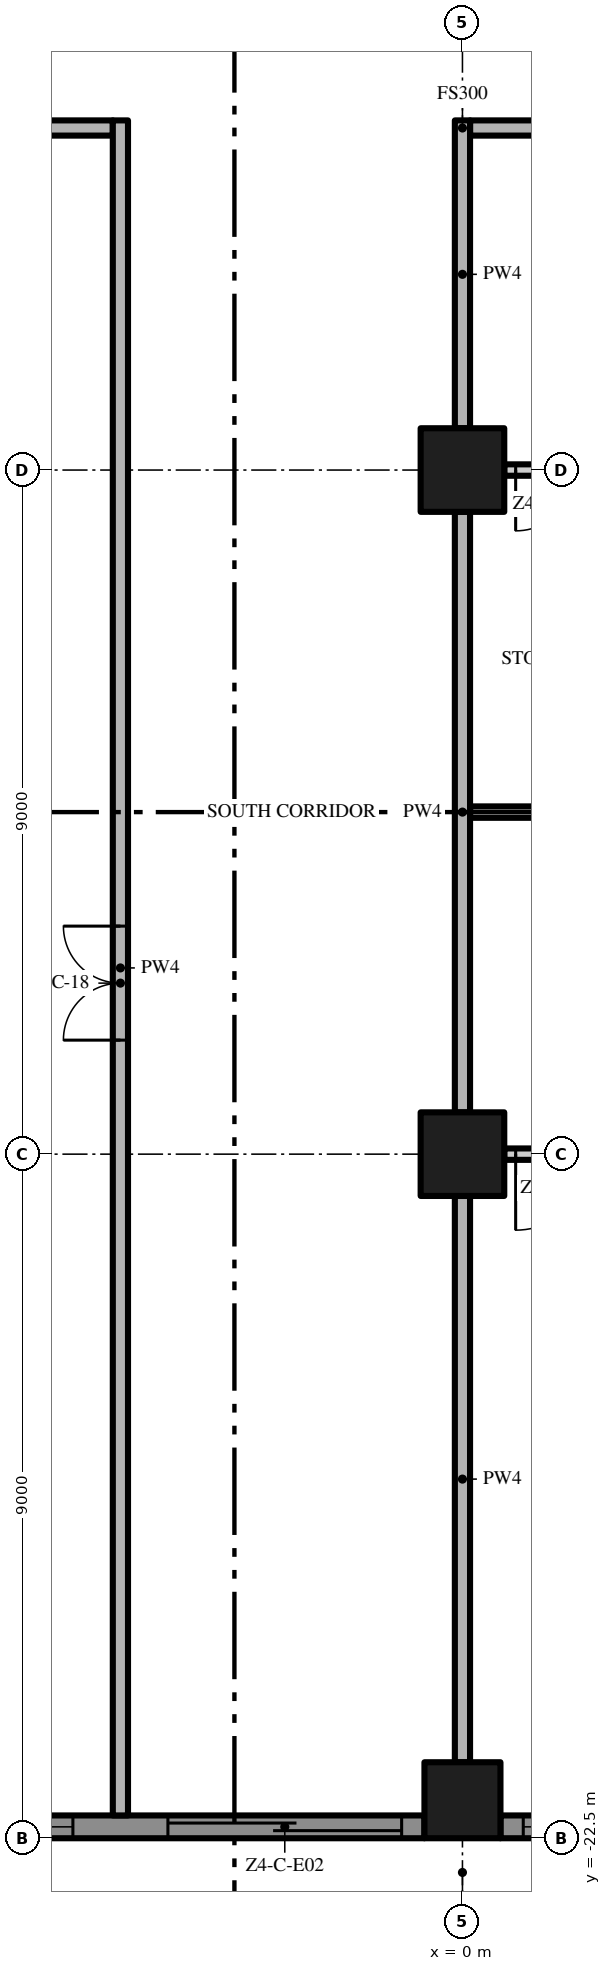
"""IFC4 building model, lengths in metres.
Left out: names, types, materials, properties, quantities, classifications, styles, units other than length and angle.
Written with IfcOpenShell. Run it as: python <this file> out.ifc"""

import sys

from ifc_helpers import new_model, si_unit, direction, frame, frame_2d, origin, origin_2d, place, context, subcontext, project, spatial, polyline, rectangle, outline, extrude, element, fill, save


model = new_model("IFC4")
c1 = context("Model", 3, precision=1e-05, world=origin(), true_north=direction((0.0, 1.0)))
c2 = subcontext(c1, "Body", "Model", "MODEL_VIEW")
j1 = project(units=[si_unit("LENGTHUNIT", "METRE"), si_unit("PLANEANGLEUNIT", "RADIAN")], contexts=[c1])
p1 = place(None, origin())
s1 = spatial("IfcSite", under=j1, at=p1, CompositionType="ELEMENT")
p2 = place(p1, origin())
s2 = spatial("IfcBuilding", under=s1, at=p2, CompositionType="ELEMENT")
p3 = place(p2, frame((0.0, 0.0, 211.0)))
s3 = spatial("IfcBuildingStorey", under=s2, at=p3, CompositionType="ELEMENT", Elevation=211.0)
p4 = place(p3, frame((0.0, -13.5, 0.0), z_axis=(0.0, 0.0, 1.0), x_axis=(1.0, 0.0, 0.0)))
e1 = element("IfcColumn", 1, at=p4, inside=s3, PredefinedType="COLUMN", context=c2, shape_type="SweptSolid", body=[
    extrude(rectangle(XDim=1.1, YDim=1.1, at=origin_2d()), origin(), (0.0, 0.0, 1.0), 3.5),
])
p5 = place(p3, frame((0.0, -22.0, 0.0), z_axis=(0.0, 0.0, 1.0), x_axis=(1.0, 0.0, 0.0)))
e2 = element("IfcColumn", 2, at=p5, inside=s3, PredefinedType="COLUMN", context=c2, shape_type="SweptSolid", body=[
    extrude(rectangle(XDim=1.0, YDim=1.0, at=origin_2d()), origin(), (0.0, 0.0, 1.0), 3.5),
])
p6 = place(p3, frame((0.0, -4.5, 0.0), z_axis=(0.0, 0.0, 1.0), x_axis=(1.0, 0.0, 0.0)))
e3 = element("IfcColumn", 3, at=p6, inside=s3, PredefinedType="COLUMN", context=c2, shape_type="SweptSolid", body=[
    extrude(rectangle(XDim=1.1, YDim=1.1, at=origin_2d()), origin(), (0.0, 0.0, 1.0), 3.5),
])
p7 = place(p3, frame((-0.5, -22.35, 0.0), z_axis=(0.0, 0.0, 1.0), x_axis=(-1.0, 0.0, 0.0)))
e4 = element("IfcWall", 4, at=p7, inside=s3, PredefinedType="SOLIDWALL", context=c2, shape_type="SweptSolid", body=[
    extrude(rectangle(XDim=8.0, YDim=0.3, at=frame_2d((4.0, 0.0))), origin(), (0.0, 0.0, 1.0), 3.5),
])
p8 = place(p7, frame((4.625, 0.0, 0.45)))
e5 = element("IfcOpeningElement", 5, at=p8, cuts=e4, PredefinedType="OPENING", context=c2, shape_type="SweptSolid", body=[
    extrude(rectangle(XDim=3.075, YDim=2.65, at=frame_2d((1.538, 1.325))), frame((0.0, 0.16, 0.0), z_axis=(0.0, -1.0, 0.0), x_axis=(1.0, 0.0, 0.0)), (0.0, 0.0, 1.0), 0.32),
])
p9 = place(p7, frame((0.3, 0.0, 0.0)))
e6 = element("IfcOpeningElement", 6, at=p9, cuts=e4, PredefinedType="OPENING", context=c2, shape_type="SweptSolid", body=[
    extrude(rectangle(XDim=3.075, YDim=2.4, at=frame_2d((1.538, 1.2))), frame((0.0, 0.16, 0.0), z_axis=(0.0, -1.0, 0.0), x_axis=(1.0, 0.0, 0.0)), (0.0, 0.0, 1.0), 0.32),
])
p10 = place(p3, frame((8.5, -22.35, 0.0), z_axis=(0.0, 0.0, 1.0), x_axis=(-1.0, 0.0, 0.0)))
e7 = element("IfcWall", 7, at=p10, inside=s3, PredefinedType="SOLIDWALL", context=c2, shape_type="SweptSolid", body=[
    extrude(rectangle(XDim=8.0, YDim=0.3, at=frame_2d((4.0, 0.0))), origin(), (0.0, 0.0, 1.0), 3.5),
])
p11 = place(p10, frame((4.625, 0.0, 0.45)))
e8 = element("IfcOpeningElement", 8, at=p11, cuts=e7, PredefinedType="OPENING", context=c2, shape_type="SweptSolid", body=[
    extrude(rectangle(XDim=3.075, YDim=2.65, at=frame_2d((1.538, 1.325))), frame((0.0, 0.16, 0.0), z_axis=(0.0, -1.0, 0.0), x_axis=(1.0, 0.0, 0.0)), (0.0, 0.0, 1.0), 0.32),
])
p12 = place(p10, frame((0.3, 0.0, 0.45)))
e9 = element("IfcOpeningElement", 9, at=p12, cuts=e7, PredefinedType="OPENING", context=c2, shape_type="SweptSolid", body=[
    extrude(rectangle(XDim=3.075, YDim=2.65, at=frame_2d((1.538, 1.325))), frame((0.0, 0.16, 0.0), z_axis=(0.0, -1.0, 0.0), x_axis=(1.0, 0.0, 0.0)), (0.0, 0.0, 1.0), 0.32),
])
p13 = place(p3, origin())
e10 = element("IfcWall", 10, at=p13, inside=s3, PredefinedType="USERDEFINED", context=c2, shape_type="SweptSolid", body=[
    extrude(outline(polyline([(-22.5, -24.3), (-21.0, -25.005), (-19.5, -25.441), (-18.75, -25.5), (-18.0, -25.441), (-16.5, -25.005), (-15.0, -24.3), (-13.5, -23.595), (-12.0, -23.159), (-11.25, -23.1), (-10.5, -23.159), (-9.0, -23.595), (-7.5, -24.3), (-6.0, -25.005), (-4.5, -25.441), (-3.75, -25.5), (-3.0, -25.441), (-1.5, -25.005), (0.0, -24.3), (1.5, -23.595), (3.0, -23.159), (3.75, -23.1), (4.5, -23.159), (6.0, -23.595), (7.5, -24.3), (9.0, -25.005), (10.5, -25.441), (11.25, -25.5), (12.0, -25.441), (13.5, -25.005), (15.0, -24.3), (16.5, -23.595), (18.0, -23.159), (18.75, -23.1), (19.5, -23.159), (21.0, -23.595), (22.5, -24.3), (22.606, -24.074), (21.089, -23.36), (19.545, -22.911), (18.75, -22.849), (17.955, -22.911), (16.411, -23.36), (14.894, -24.074), (13.411, -24.771), (11.955, -25.194), (11.25, -25.249), (10.545, -25.194), (9.089, -24.771), (7.606, -24.074), (6.089, -23.36), (4.545, -22.911), (3.75, -22.849), (2.955, -22.911), (1.411, -23.36), (-0.106, -24.074), (-1.589, -24.771), (-3.045, -25.194), (-3.75, -25.249), (-4.455, -25.194), (-5.911, -24.771), (-7.394, -24.074), (-8.911, -23.36), (-10.455, -22.911), (-11.25, -22.849), (-12.045, -22.911), (-13.589, -23.36), (-15.106, -24.074), (-16.589, -24.771), (-18.045, -25.194), (-18.75, -25.249), (-19.455, -25.194), (-20.911, -24.771), (-22.394, -24.074), (-22.5, -24.3)])), origin(), (0.0, 0.0, 1.0), 0.9),
])
p14 = place(p3, frame((8.45, -13.5, 0.0), z_axis=(0.0, 0.0, 1.0), x_axis=(-1.0, 0.0, 0.0)))
e11 = element("IfcWall", 11, at=p14, inside=s3, PredefinedType="PARTITIONING", context=c2, shape_type="SweptSolid", body=[
    extrude(rectangle(XDim=7.9, YDim=0.15, at=frame_2d((3.95, 0.0))), origin(), (0.0, 0.0, 1.0), 3.5),
])
p15 = place(p14, frame((6.75, 0.0, 0.0)))
e12 = element("IfcOpeningElement", 12, at=p15, cuts=e11, PredefinedType="OPENING", context=c2, shape_type="SweptSolid", body=[
    extrude(rectangle(XDim=1.0, YDim=2.4, at=frame_2d((0.5, 1.2))), frame((0.0, 0.085, 0.0), z_axis=(0.0, -1.0, 0.0), x_axis=(1.0, 0.0, 0.0)), (0.0, 0.0, 1.0), 0.17),
])
p16 = place(p14, frame((0.15, 0.0, 0.0)))
e13 = element("IfcOpeningElement", 13, at=p16, cuts=e11, PredefinedType="OPENING", context=c2, shape_type="SweptSolid", body=[
    extrude(rectangle(XDim=1.0, YDim=2.4, at=frame_2d((0.5, 1.2))), frame((0.0, 0.085, 0.0), z_axis=(0.0, -1.0, 0.0), x_axis=(1.0, 0.0, 0.0)), (0.0, 0.0, 1.0), 0.17),
])
p17 = place(p3, frame((0.1, -9.0, 0.0), z_axis=(0.0, 0.0, 1.0), x_axis=(1.0, 0.0, 0.0)))
e14 = element("IfcWall", 14, at=p17, inside=s3, PredefinedType="PARTITIONING", context=c2, shape_type="SweptSolid", body=[
    extrude(rectangle(XDim=11.525, YDim=0.15, at=frame_2d((5.763, 0.0))), origin(), (0.0, 0.0, 1.0), 3.5),
])
p18 = place(p17, frame((5.85, 0.0, 0.0)))
e15 = element("IfcOpeningElement", 15, at=p18, cuts=e14, PredefinedType="OPENING", context=c2, shape_type="SweptSolid", body=[
    extrude(rectangle(XDim=1.0, YDim=2.4, at=frame_2d((0.5, 1.2))), frame((0.0, 0.085, 0.0), z_axis=(0.0, -1.0, 0.0), x_axis=(1.0, 0.0, 0.0)), (0.0, 0.0, 1.0), 0.17),
])
p19 = place(p3, frame((8.45, -4.5, 0.0), z_axis=(0.0, 0.0, 1.0), x_axis=(-1.0, 0.0, 0.0)))
e16 = element("IfcWall", 16, at=p19, inside=s3, PredefinedType="PARTITIONING", context=c2, shape_type="SweptSolid", body=[
    extrude(rectangle(XDim=7.9, YDim=0.15, at=frame_2d((3.95, 0.0))), origin(), (0.0, 0.0, 1.0), 3.5),
])
p20 = place(p19, frame((6.95, 0.0, 0.0)))
e17 = element("IfcOpeningElement", 17, at=p20, cuts=e16, PredefinedType="OPENING", context=c2, shape_type="SweptSolid", body=[
    extrude(rectangle(XDim=0.8, YDim=2.0, at=frame_2d((0.4, 1.0))), frame((0.0, 0.085, 0.0), z_axis=(0.0, -1.0, 0.0), x_axis=(1.0, 0.0, 0.0)), (0.0, 0.0, 1.0), 0.17),
])
p21 = place(p19, frame((5.45, 0.0, 0.0)))
e18 = element("IfcOpeningElement", 18, at=p21, cuts=e16, PredefinedType="OPENING", context=c2, shape_type="SweptSolid", body=[
    extrude(rectangle(XDim=0.8, YDim=2.0, at=frame_2d((0.4, 1.0))), frame((0.0, 0.085, 0.0), z_axis=(0.0, -1.0, 0.0), x_axis=(1.0, 0.0, 0.0)), (0.0, 0.0, 1.0), 0.17),
])
p22 = place(p3, frame((-17.4, 0.0, 0.0), z_axis=(0.0, 0.0, 1.0), x_axis=(1.0, 0.0, 0.0)))
e19 = element("IfcWall", 19, at=p22, inside=s3, PredefinedType="PARTITIONING", context=c2, shape_type="SweptSolid", body=[
    extrude(rectangle(XDim=12.8, YDim=0.2, at=frame_2d((6.4, 0.0))), origin(), (0.0, 0.0, 1.0), 3.5),
])
p23 = place(p3, frame((17.4, 0.0, 0.0), z_axis=(0.0, 0.0, 1.0), x_axis=(-1.0, 0.0, 0.0)))
e20 = element("IfcWall", 20, at=p23, inside=s3, PredefinedType="PARTITIONING", context=c2, shape_type="SweptSolid", body=[
    extrude(rectangle(XDim=17.3, YDim=0.2, at=frame_2d((8.65, 0.0))), origin(), (0.0, 0.0, 1.0), 3.5),
])
p24 = place(p23, frame((7.65, 0.0, 0.0)))
e21 = element("IfcOpeningElement", 21, at=p24, cuts=e20, PredefinedType="OPENING", context=c2, shape_type="SweptSolid", body=[
    extrude(rectangle(XDim=1.5, YDim=2.4, at=frame_2d((0.75, 1.2))), frame((0.0, 0.11, 0.0), z_axis=(0.0, -1.0, 0.0), x_axis=(1.0, 0.0, 0.0)), (0.0, 0.0, 1.0), 0.22),
])
p25 = place(p3, frame((-4.5, -22.2, 0.0), z_axis=(0.0, 0.0, 1.0), x_axis=(0.0, 1.0, 0.0)))
e22 = element("IfcWall", 22, at=p25, inside=s3, PredefinedType="PARTITIONING", context=c2, shape_type="SweptSolid", body=[
    extrude(rectangle(XDim=22.3, YDim=0.2, at=frame_2d((11.15, 0.0))), origin(), (0.0, 0.0, 1.0), 3.5),
])
p26 = place(p25, frame((10.2, 0.0, 0.0)))
e23 = element("IfcOpeningElement", 23, at=p26, cuts=e22, PredefinedType="OPENING", context=c2, shape_type="SweptSolid", body=[
    extrude(rectangle(XDim=1.5, YDim=2.4, at=frame_2d((0.75, 1.2))), frame((0.0, 0.11, 0.0), z_axis=(0.0, -1.0, 0.0), x_axis=(1.0, 0.0, 0.0)), (0.0, 0.0, 1.0), 0.22),
])
p27 = place(p3, frame((0.0, -21.5, 0.0), z_axis=(0.0, 0.0, 1.0), x_axis=(0.0, 1.0, 0.0)))
e24 = element("IfcWall", 24, at=p27, inside=s3, PredefinedType="PARTITIONING", context=c2, shape_type="SweptSolid", body=[
    extrude(rectangle(XDim=7.45, YDim=0.2, at=frame_2d((3.725, 0.0))), origin(), (0.0, 0.0, 1.0), 3.5),
])
p28 = place(p3, frame((0.0, -12.95, 0.0), z_axis=(0.0, 0.0, 1.0), x_axis=(0.0, 1.0, 0.0)))
e25 = element("IfcWall", 25, at=p28, inside=s3, PredefinedType="PARTITIONING", context=c2, shape_type="SweptSolid", body=[
    extrude(rectangle(XDim=7.9, YDim=0.2, at=frame_2d((3.95, 0.0))), origin(), (0.0, 0.0, 1.0), 3.5),
])
p29 = place(p3, frame((0.0, -3.95, 0.0), z_axis=(0.0, 0.0, 1.0), x_axis=(0.0, 1.0, 0.0)))
e26 = element("IfcWall", 26, at=p29, inside=s3, PredefinedType="PARTITIONING", context=c2, shape_type="SweptSolid", body=[
    extrude(rectangle(XDim=4.05, YDim=0.2, at=frame_2d((2.025, 0.0))), origin(), (0.0, 0.0, 1.0), 3.5),
])
p30 = place(p8, origin())
e27 = element("IfcWindow", 27, at=p30, inside=s3, PartitioningType="SINGLE_PANEL", PredefinedType="WINDOW", context=c2, shape_type="SweptSolid", body=[
    extrude(rectangle(XDim=3.075, YDim=2.65, at=frame_2d((1.538, 1.325))), frame((0.0, 0.03, 0.0), z_axis=(0.0, -1.0, 0.0), x_axis=(1.0, 0.0, 0.0)), (0.0, 0.0, 1.0), 0.06),
])
fill(e5, e27)
p31 = place(p9, origin())
e28 = element("IfcDoor", 28, at=p31, inside=s3, OperationType="SINGLE_SWING_LEFT", PredefinedType="DOOR", context=c2, shape_type="SweptSolid", body=[
    extrude(rectangle(XDim=3.075, YDim=2.4, at=frame_2d((1.538, 1.2))), frame((0.0, 0.025, 0.0), z_axis=(0.0, -1.0, 0.0), x_axis=(1.0, 0.0, 0.0)), (0.0, 0.0, 1.0), 0.05),
])
fill(e6, e28)
p32 = place(p11, origin())
e29 = element("IfcWindow", 29, at=p32, inside=s3, PartitioningType="SINGLE_PANEL", PredefinedType="WINDOW", context=c2, shape_type="SweptSolid", body=[
    extrude(rectangle(XDim=3.075, YDim=2.65, at=frame_2d((1.538, 1.325))), frame((0.0, 0.03, 0.0), z_axis=(0.0, -1.0, 0.0), x_axis=(1.0, 0.0, 0.0)), (0.0, 0.0, 1.0), 0.06),
])
fill(e8, e29)
p33 = place(p26, origin())
e30 = element("IfcDoor", 30, at=p33, inside=s3, OperationType="DOUBLE_DOOR_SINGLE_SWING", PredefinedType="DOOR", context=c2, shape_type="SweptSolid", body=[
    extrude(rectangle(XDim=1.5, YDim=2.4, at=frame_2d((0.75, 1.2))), frame((0.0, 0.025, 0.0), z_axis=(0.0, -1.0, 0.0), x_axis=(1.0, 0.0, 0.0)), (0.0, 0.0, 1.0), 0.05),
])
fill(e23, e30)
p34 = place(p20, origin())
e31 = element("IfcDoor", 31, at=p34, inside=s3, OperationType="SINGLE_SWING_RIGHT", PredefinedType="DOOR", context=c2, shape_type="SweptSolid", body=[
    extrude(rectangle(XDim=0.8, YDim=2.0, at=frame_2d((0.4, 1.0))), frame((0.0, 0.025, 0.0), z_axis=(0.0, -1.0, 0.0), x_axis=(1.0, 0.0, 0.0)), (0.0, 0.0, 1.0), 0.05),
])
fill(e17, e31)
p35 = place(p15, origin())
e32 = element("IfcDoor", 32, at=p35, inside=s3, OperationType="SINGLE_SWING_RIGHT", PredefinedType="DOOR", context=c2, shape_type="SweptSolid", body=[
    extrude(rectangle(XDim=1.0, YDim=2.4, at=frame_2d((0.5, 1.2))), frame((0.0, 0.025, 0.0), z_axis=(0.0, -1.0, 0.0), x_axis=(1.0, 0.0, 0.0)), (0.0, 0.0, 1.0), 0.05),
])
fill(e12, e32)
save(model, sys.argv[1])
